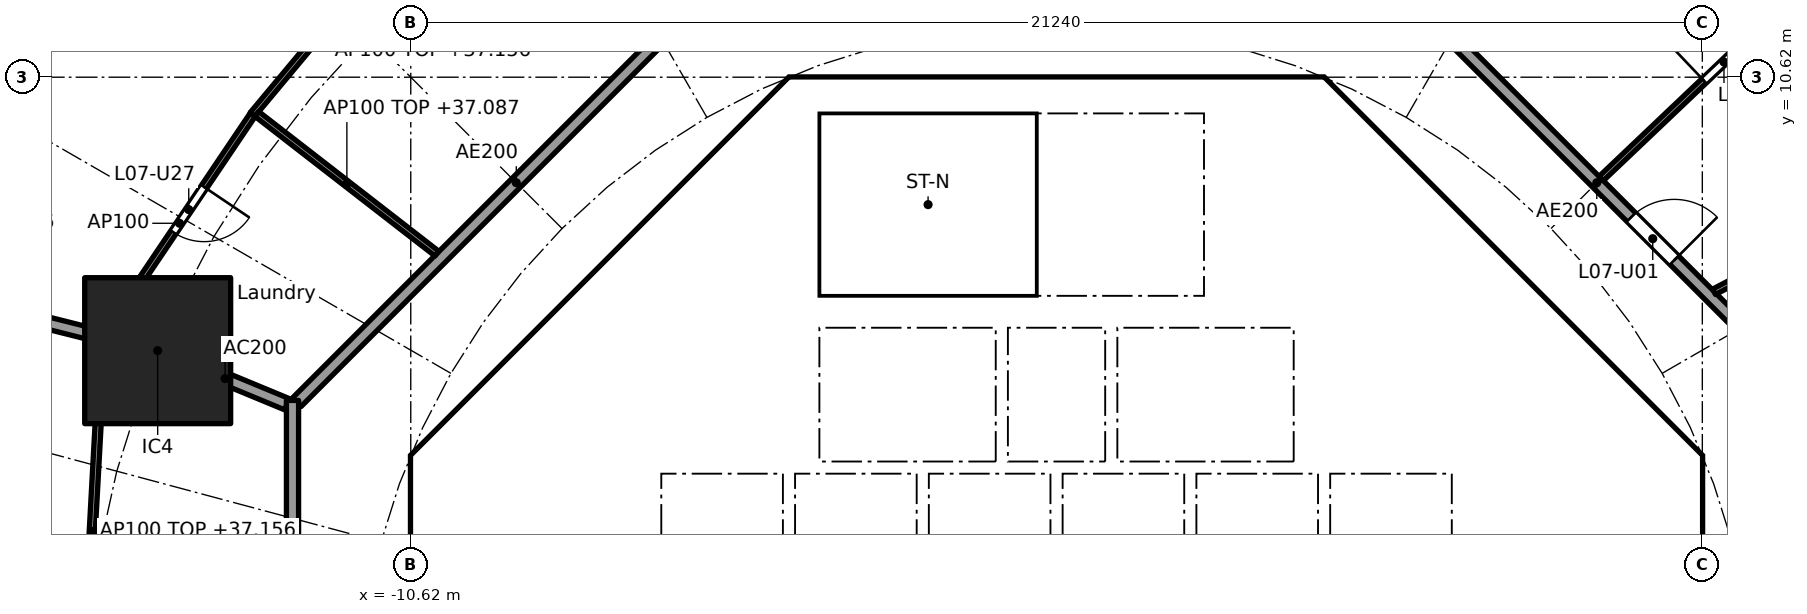
"""IFC4 building model, lengths in metres.
Left out: names, types, materials, properties, quantities, classifications, styles, units other than length and angle.
Written with IfcOpenShell. Run it as: python <this file> out.ifc"""

import sys

from ifc_helpers import new_model, si_unit, direction, frame, frame_2d, origin, origin_2d, place, context, subcontext, project, spatial, polyline, rectangle, outline, extrude, element, fill, save


model = new_model("IFC4")
c1 = context("Model", 3, precision=1e-05, world=origin(), true_north=direction((0.0, 1.0)))
c2 = subcontext(c1, "Body", "Model", "MODEL_VIEW")
j1 = project(units=[si_unit("LENGTHUNIT", "METRE"), si_unit("PLANEANGLEUNIT", "RADIAN")], contexts=[c1])
p1 = place(None, origin())
s1 = spatial("IfcSite", under=j1, at=p1, CompositionType="ELEMENT")
p2 = place(p1, origin())
s2 = spatial("IfcBuilding", under=s1, at=p2, CompositionType="ELEMENT")
p3 = place(p2, frame((0.0, 0.0, 34.4)))
s3 = spatial("IfcBuildingStorey", under=s2, at=p3, CompositionType="ELEMENT", Elevation=34.4)
p4 = place(p3, frame((-14.782, 6.123, 0.0), z_axis=(0.0, 0.0, 1.0), x_axis=(1.0, 0.0, 0.0)))
e1 = element("IfcColumn", 1, at=p4, inside=s3, PredefinedType="COLUMN", context=c2, shape_type="SweptSolid", body=[
    extrude(rectangle(XDim=2.4, YDim=2.4, at=origin_2d()), origin(), (0.0, 0.0, 1.0), 3.7),
])
p5 = place(p3, frame((9.988, 4.613, 0.0), z_axis=(0.0, 0.0, 1.0), x_axis=(-0.707106781187, 0.707106781187, 0.0)))
e2 = element("IfcWall", 2, at=p5, inside=s3, PredefinedType="SHEAR", context=c2, shape_type="SweptSolid", body=[
    extrude(rectangle(XDim=7.602, YDim=0.6, at=frame_2d((3.801, 0.0))), origin(), (0.0, 0.0, 1.0), 3.44),
])
p6 = place(p5, frame((3.201, 0.0, 0.0)))
e3 = element("IfcOpeningElement", 3, at=p6, cuts=e2, PredefinedType="OPENING", context=c2, shape_type="SweptSolid", body=[
    extrude(rectangle(XDim=1.2, YDim=2.1, at=frame_2d((0.6, 1.05))), frame((0.0, 0.31, 0.0), z_axis=(0.0, -1.0, 0.0), x_axis=(1.0, 0.0, 0.0)), (0.0, 0.0, 1.0), 0.62),
])
p7 = place(p3, frame((-4.613, 9.988, 0.0), z_axis=(0.0, 0.0, 1.0), x_axis=(-0.707106781187, -0.707106781187, 0.0)))
e4 = element("IfcWall", 4, at=p7, inside=s3, PredefinedType="SHEAR", context=c2, shape_type="SweptSolid", body=[
    extrude(rectangle(XDim=7.602, YDim=0.6, at=frame_2d((3.801, 0.0))), origin(), (0.0, 0.0, 1.0), 3.44),
])
p8 = place(p7, frame((0.351, 0.0, 0.0)))
e5 = element("IfcOpeningElement", 5, at=p8, cuts=e4, PredefinedType="OPENING", context=c2, shape_type="SweptSolid", body=[
    extrude(rectangle(XDim=1.1, YDim=2.1, at=frame_2d((0.55, 1.05))), frame((0.0, 0.31, 0.0), z_axis=(0.0, -1.0, 0.0), x_axis=(1.0, 0.0, 0.0)), (0.0, 0.0, 1.0), 0.62),
])
p9 = place(p3, frame((-10.325, 3.801, 0.0), z_axis=(0.0, 0.0, 1.0), x_axis=(0.0, -1.0, 0.0)))
e6 = element("IfcWall", 6, at=p9, inside=s3, PredefinedType="SHEAR", context=c2, shape_type="SweptSolid", body=[
    extrude(rectangle(XDim=7.602, YDim=0.6, at=frame_2d((3.801, 0.0))), origin(), (0.0, 0.0, 1.0), 3.44),
])
p10 = place(p9, frame((0.651, 0.0, 0.0)))
e7 = element("IfcOpeningElement", 7, at=p10, cuts=e6, PredefinedType="OPENING", context=c2, shape_type="SweptSolid", body=[
    extrude(rectangle(XDim=1.5, YDim=2.1, at=frame_2d((0.75, 1.05))), frame((0.0, 0.31, 0.0), z_axis=(0.0, -1.0, 0.0), x_axis=(1.0, 0.0, 0.0)), (0.0, 0.0, 1.0), 0.62),
])
p11 = place(p9, frame((5.451, 0.0, 0.0)))
e8 = element("IfcOpeningElement", 8, at=p11, cuts=e6, PredefinedType="OPENING", context=c2, shape_type="SweptSolid", body=[
    extrude(rectangle(XDim=1.5, YDim=2.1, at=frame_2d((0.75, 1.05))), frame((0.0, 0.31, 0.0), z_axis=(0.0, -1.0, 0.0), x_axis=(1.0, 0.0, 0.0)), (0.0, 0.0, 1.0), 0.62),
])
p12 = place(p3, frame((-6.2, 4.3, 0.0), z_axis=(0.0, 0.0, 1.0), x_axis=(0.0, 1.0, 0.0)))
e9 = element("IfcWall", 9, at=p12, inside=s3, PredefinedType="PARTITIONING", context=c2, shape_type="SweptSolid", body=[
    extrude(rectangle(XDim=3.527, YDim=0.15, at=frame_2d((1.763, 0.0))), origin(), (0.0, 0.0, 1.0), 3.44),
])
p13 = place(p12, frame((0.262, 0.0, 0.0)))
e10 = element("IfcOpeningElement", 10, at=p13, cuts=e9, PredefinedType="OPENING", context=c2, shape_type="SweptSolid", body=[
    extrude(rectangle(XDim=0.9, YDim=2.1, at=frame_2d((0.45, 1.05))), frame((0.0, 0.085, 0.0), z_axis=(0.0, -1.0, 0.0), x_axis=(1.0, 0.0, 0.0)), (0.0, 0.0, 1.0), 0.17),
])
p14 = place(p12, frame((2.138, 0.0, 0.0)))
e11 = element("IfcOpeningElement", 11, at=p14, cuts=e9, PredefinedType="OPENING", context=c2, shape_type="SweptSolid", body=[
    extrude(rectangle(XDim=0.9, YDim=2.1, at=frame_2d((0.45, 1.05))), frame((0.0, 0.085, 0.0), z_axis=(0.0, -1.0, 0.0), x_axis=(1.0, 0.0, 0.0)), (0.0, 0.0, 1.0), 0.17),
])
p15 = place(p3, frame((4.0, 4.3, 0.0), z_axis=(0.0, 0.0, 1.0), x_axis=(0.0, 1.0, 0.0)))
e12 = element("IfcWall", 12, at=p15, inside=s3, PredefinedType="SOLIDWALL", context=c2, shape_type="SweptSolid", body=[
    extrude(rectangle(XDim=2.2, YDim=0.2, at=frame_2d((1.1, 0.0))), origin(), (0.0, 0.0, 1.0), 3.44),
])
p16 = place(p15, frame((0.55, 0.0, 0.0)))
e13 = element("IfcOpeningElement", 13, at=p16, cuts=e12, PredefinedType="OPENING", context=c2, shape_type="SweptSolid", body=[
    extrude(rectangle(XDim=1.1, YDim=2.1, at=frame_2d((0.55, 1.05))), frame((0.0, 0.11, 0.0), z_axis=(0.0, -1.0, 0.0), x_axis=(1.0, 0.0, 0.0)), (0.0, 0.0, 1.0), 0.22),
])
p17 = place(p3, frame((-4.0, 4.3, 0.0), z_axis=(0.0, 0.0, 1.0), x_axis=(0.0, 1.0, 0.0)))
e14 = element("IfcWall", 14, at=p17, inside=s3, PredefinedType="SOLIDWALL", context=c2, shape_type="SweptSolid", body=[
    extrude(rectangle(XDim=2.2, YDim=0.2, at=frame_2d((1.1, 0.0))), origin(), (0.0, 0.0, 1.0), 3.44),
])
p18 = place(p17, frame((0.55, 0.0, 0.0)))
e15 = element("IfcOpeningElement", 15, at=p18, cuts=e14, PredefinedType="OPENING", context=c2, shape_type="SweptSolid", body=[
    extrude(rectangle(XDim=1.1, YDim=2.1, at=frame_2d((0.55, 1.05))), frame((0.0, 0.11, 0.0), z_axis=(0.0, -1.0, 0.0), x_axis=(1.0, 0.0, 0.0)), (0.0, 0.0, 1.0), 0.22),
])
p19 = place(p3, frame((6.7, 4.0, 0.0), z_axis=(0.0, 0.0, 1.0), x_axis=(1.0, 0.0, 0.0)))
e16 = element("IfcWall", 16, at=p19, inside=s3, PredefinedType="SOLIDWALL", context=c2, shape_type="SweptSolid", body=[
    extrude(rectangle(XDim=3.325, YDim=0.2, at=frame_2d((1.662, 0.0))), origin(), (0.0, 0.0, 1.0), 3.44),
])
p20 = place(p19, frame((1.25, 0.0, 0.0)))
e17 = element("IfcOpeningElement", 17, at=p20, cuts=e16, PredefinedType="OPENING", context=c2, shape_type="SweptSolid", body=[
    extrude(rectangle(XDim=1.1, YDim=2.1, at=frame_2d((0.55, 1.05))), frame((0.0, 0.11, 0.0), z_axis=(0.0, -1.0, 0.0), x_axis=(1.0, 0.0, 0.0)), (0.0, 0.0, 1.0), 0.22),
])
p21 = place(p3, frame((4.0, 7.025, 0.0), z_axis=(0.0, 0.0, 1.0), x_axis=(0.0, 1.0, 0.0)))
e18 = element("IfcWall", 18, at=p21, inside=s3, PredefinedType="SOLIDWALL", context=c2, shape_type="SweptSolid", body=[
    extrude(rectangle(XDim=3.0, YDim=0.2, at=frame_2d((1.5, 0.0))), origin(), (0.0, 0.0, 1.0), 3.44),
])
p22 = place(p21, frame((0.925, 0.0, 0.0)))
e19 = element("IfcOpeningElement", 19, at=p22, cuts=e18, PredefinedType="OPENING", context=c2, shape_type="SweptSolid", body=[
    extrude(rectangle(XDim=1.1, YDim=2.1, at=frame_2d((0.55, 1.05))), frame((0.0, 0.11, 0.0), z_axis=(0.0, -1.0, 0.0), x_axis=(1.0, 0.0, 0.0)), (0.0, 0.0, 1.0), 0.22),
])
p23 = place(p3, origin())
e20 = element("IfcWall", 20, at=p23, inside=s3, PredefinedType="SHEAR", context=c2, shape_type="SweptSolid", body=[
    extrude(outline(polyline([(-10.2, 4.825), (-9.776, 4.401), (-10.025, 4.152), (-10.025, 3.801), (-10.625, 3.801), (-10.625, 4.401), (-10.2, 4.825)])), origin(), (0.0, 0.0, 1.0), 3.44),
])
p24 = place(p3, origin())
e21 = element("IfcWall", 21, at=p24, inside=s3, PredefinedType="SHEAR", context=c2, shape_type="SweptSolid", body=[
    extrude(outline(polyline([(-4.152, 10.025), (-4.401, 9.776), (-4.825, 10.2), (-4.401, 10.625), (4.401, 10.625), (4.825, 10.2), (4.401, 9.776), (4.152, 10.025), (-4.152, 10.025)])), origin(), (0.0, 0.0, 1.0), 3.44),
])
p25 = place(p3, origin())
e22 = element("IfcWall", 22, at=p25, inside=s3, PredefinedType="SHEAR", context=c2, shape_type="SweptSolid", body=[
    extrude(outline(polyline([(9.776, -4.401), (10.025, -4.152), (10.025, -3.801), (10.025, 4.152), (9.776, 4.401), (10.2, 4.825), (10.625, 4.401), (10.625, -4.401), (10.2, -4.825), (9.776, -4.401)])), origin(), (0.0, 0.0, 1.0), 3.44),
])
p26 = place(p3, frame((-10.025, 4.0, 0.0), z_axis=(0.0, 0.0, 1.0), x_axis=(1.0, 0.0, 0.0)))
e23 = element("IfcWall", 23, at=p26, inside=s3, PredefinedType="PARTITIONING", context=c2, shape_type="SweptSolid", body=[
    extrude(rectangle(XDim=3.325, YDim=0.2, at=frame_2d((1.662, 0.0))), origin(), (0.0, 0.0, 1.0), 3.44),
])
p27 = place(p3, frame((-8.301, 5.8, 0.0), z_axis=(0.0, 0.0, 1.0), x_axis=(1.0, 0.0, 0.0)))
e24 = element("IfcWall", 24, at=p27, inside=s3, PredefinedType="PARTITIONING", context=c2, shape_type="SweptSolid", body=[
    extrude(rectangle(XDim=2.026, YDim=0.15, at=frame_2d((1.013, 0.0))), origin(), (0.0, 0.0, 1.0), 3.44),
])
for number, where, z_axis, x_axis in (
    (25, (-0.9, 4.3, 0.0), (0.0, 0.0, 1.0), (0.0, 1.0, 0.0)),
    (26, (0.9, 4.3, 0.0), (0.0, 0.0, 1.0), (0.0, 1.0, 0.0)),
):
    element("IfcWall", number, at=place(p3, frame(where, z_axis=z_axis, x_axis=x_axis)), inside=s3, PredefinedType="SOLIDWALL", context=c2, shape_type="SweptSolid", body=[
        extrude(rectangle(XDim=2.2, YDim=0.2, at=frame_2d((1.1, 0.0))), origin(), (0.0, 0.0, 1.0), 3.44),
    ])
p28 = place(p3, origin())
e27 = element("IfcWall", 27, at=p28, inside=s3, PredefinedType="SOLIDWALL", context=c2, shape_type="SweptSolid", body=[
    extrude(outline(polyline([(-6.5, 2.1), (-6.7, 2.1), (-6.7, 4.3), (6.7, 4.3), (6.7, 2.1), (6.5, 2.1), (6.5, 4.1), (4.5, 4.1), (4.5, 2.1), (4.3, 2.1), (4.3, 4.1), (2.3, 4.1), (2.3, 2.1), (2.1, 2.1), (2.1, 4.1), (0.1, 4.1), (0.1, 2.1), (-0.1, 2.1), (-0.1, 4.1), (-2.1, 4.1), (-2.1, 2.1), (-2.3, 2.1), (-2.3, 4.1), (-4.3, 4.1), (-4.3, 2.1), (-4.5, 2.1), (-4.5, 4.1), (-6.5, 4.1), (-6.5, 2.1)])), origin(), (0.0, 0.0, 1.0), 3.44),
])
p29 = place(p3, origin())
e28 = element("IfcWall", 28, at=p29, inside=s3, PredefinedType="SOLIDWALL", context=c2, shape_type="SweptSolid", body=[
    extrude(outline(polyline([(-3.9, 7.025), (-4.1, 7.025), (-4.1, 10.025), (-3.9, 10.025), (-3.9, 7.025)])), origin(), (0.0, 0.0, 1.0), 3.44),
])
p30 = place(p3, origin())
e29 = element("IfcWall", 29, at=p30, inside=s3, PredefinedType="SOLIDWALL", context=c2, shape_type="SweptSolid", body=[
    extrude(outline(polyline([(4.1, 6.5), (-4.1, 6.5), (-4.1, 7.025), (4.1, 7.025), (4.1, 6.5)])), origin(), (0.0, 0.0, 1.0), 3.44),
])
p31 = place(p3, origin())
e30 = element("IfcWall", 30, at=p31, inside=s3, PredefinedType="SOLIDWALL", context=c2, shape_type="SweptSolid", body=[
    extrude(outline(polyline([(7.025, -3.9), (6.7, -3.9), (6.7, 3.9), (7.025, 3.9), (7.025, -3.9)])), origin(), (0.0, 0.0, 1.0), 3.44),
])
p32 = place(p3, frame((-12.657, 5.243, 0.0), z_axis=(0.0, 0.0, 1.0), x_axis=(-0.923885664896, 0.382668627144, 0.0)))
e31 = element("IfcWall", 31, at=p32, inside=s3, PredefinedType="PARTITIONING", context=c2, shape_type="SweptSolid", body=[
    extrude(rectangle(XDim=2.2, YDim=0.2, at=frame_2d((1.1, 0.0))), origin(), (0.0, 0.0, 1.0), 3.44),
])
p33 = place(p3, frame((-14.831, 6.135, 0.0), z_axis=(0.0, 0.0, 1.0), x_axis=(-0.969884949569, 0.243563512454, 0.0)))
e32 = element("IfcWall", 32, at=p33, inside=s3, PredefinedType="PARTITIONING", context=c2, shape_type="SweptSolid", body=[
    extrude(rectangle(XDim=8.829, YDim=0.2, at=frame_2d((4.415, 0.0))), origin(), (0.0, 0.0, 1.0), 2.756),
])
p34 = place(p3, frame((12.635, 5.134, 0.0), z_axis=(0.0, 0.0, 1.0), x_axis=(-0.707106781187, 0.707106781187, 0.0)))
e33 = element("IfcWall", 33, at=p34, inside=s3, PredefinedType="PARTITIONING", context=c2, shape_type="SweptSolid", body=[
    extrude(rectangle(XDim=10.609, YDim=0.2, at=frame_2d((5.305, 0.0))), origin(), (0.0, 0.0, 1.0), 3.44),
])
p35 = place(p34, frame((3.503, 0.0, 0.0)))
e34 = element("IfcOpeningElement", 34, at=p35, cuts=e33, PredefinedType="OPENING", context=c2, shape_type="SweptSolid", body=[
    extrude(rectangle(XDim=1.0, YDim=2.1, at=frame_2d((0.5, 1.05))), frame((0.0, 0.11, 0.0), z_axis=(0.0, -1.0, 0.0), x_axis=(1.0, 0.0, 0.0)), (0.0, 0.0, 1.0), 0.22),
])
p36 = place(p3, frame((-5.275, 12.494, 0.0), z_axis=(0.0, 0.0, 1.0), x_axis=(-0.707106781187, -0.707106781187, 0.0)))
e35 = element("IfcWall", 35, at=p36, inside=s3, PredefinedType="PARTITIONING", context=c2, shape_type="SweptSolid", body=[
    extrude(rectangle(XDim=10.209, YDim=0.2, at=frame_2d((5.104, 0.0))), origin(), (0.0, 0.0, 1.0), 3.44),
])
p37 = place(p3, frame((-12.565, 5.304, 0.0), z_axis=(0.0, 0.0, 1.0), x_axis=(0.0, -1.0, 0.0)))
e36 = element("IfcWall", 36, at=p37, inside=s3, PredefinedType="PARTITIONING", context=c2, shape_type="SweptSolid", body=[
    extrude(rectangle(XDim=10.409, YDim=0.2, at=frame_2d((5.205, 0.0))), origin(), (0.0, 0.0, 1.0), 3.44),
])
p38 = place(p3, frame((10.813, 7.091, 0.0), z_axis=(0.0, 0.0, 1.0), x_axis=(0.885182649479, 0.465243674928, 0.0)))
e37 = element("IfcWall", 37, at=p38, inside=s3, PredefinedType="PARTITIONING", context=c2, shape_type="SweptSolid", body=[
    extrude(rectangle(XDim=12.551, YDim=0.1, at=frame_2d((6.275, 0.0))), origin(), (0.0, 0.0, 1.0), 2.687),
])
p39 = place(p38, frame((0.539, 0.0, 0.0)))
e38 = element("IfcOpeningElement", 38, at=p39, cuts=e37, PredefinedType="OPENING", context=c2, shape_type="SweptSolid", body=[
    extrude(rectangle(XDim=0.9, YDim=2.1, at=frame_2d((0.45, 1.05))), frame((0.0, 0.06, 0.0), z_axis=(0.0, -1.0, 0.0), x_axis=(1.0, 0.0, 0.0)), (0.0, 0.0, 1.0), 0.12),
])
p40 = place(p38, frame((8.494, 0.0, 0.0)))
e39 = element("IfcOpeningElement", 39, at=p40, cuts=e37, PredefinedType="OPENING", context=c2, shape_type="SweptSolid", body=[
    extrude(rectangle(XDim=0.9, YDim=2.1, at=frame_2d((0.45, 1.05))), frame((0.0, 0.06, 0.0), z_axis=(0.0, -1.0, 0.0), x_axis=(1.0, 0.0, 0.0)), (0.0, 0.0, 1.0), 0.12),
])
p41 = place(p3, frame((8.957, 8.953, 0.0), z_axis=(0.0, 0.0, 1.0), x_axis=(0.725250022034, 0.688485588476, 0.0)))
e40 = element("IfcWall", 40, at=p41, inside=s3, PredefinedType="PARTITIONING", context=c2, shape_type="SweptSolid", body=[
    extrude(rectangle(XDim=12.963, YDim=0.1, at=frame_2d((6.481, 0.0))), origin(), (0.0, 0.0, 1.0), 2.687),
])
p42 = place(p41, frame((2.333, 0.0, 0.0)))
e41 = element("IfcOpeningElement", 41, at=p42, cuts=e40, PredefinedType="OPENING", context=c2, shape_type="SweptSolid", body=[
    extrude(rectangle(XDim=0.9, YDim=2.1, at=frame_2d((0.45, 1.05))), frame((0.0, 0.06, 0.0), z_axis=(0.0, -1.0, 0.0), x_axis=(1.0, 0.0, 0.0)), (0.0, 0.0, 1.0), 0.12),
])
p43 = place(p41, frame((8.79, 0.0, 0.0)))
e42 = element("IfcOpeningElement", 42, at=p43, cuts=e40, PredefinedType="OPENING", context=c2, shape_type="SweptSolid", body=[
    extrude(rectangle(XDim=0.9, YDim=2.1, at=frame_2d((0.45, 1.05))), frame((0.0, 0.06, 0.0), z_axis=(0.0, -1.0, 0.0), x_axis=(1.0, 0.0, 0.0)), (0.0, 0.0, 1.0), 0.12),
])
p44 = place(p3, frame((-10.123, 13.72, 0.0), z_axis=(0.0, 0.0, 1.0), x_axis=(-0.64083455704, -0.767679015282, 0.0)))
e43 = element("IfcWall", 43, at=p44, inside=s3, PredefinedType="PARTITIONING", context=c2, shape_type="SweptSolid", body=[
    extrude(rectangle(XDim=4.837, YDim=0.1, at=frame_2d((2.418, 0.0))), origin(), (0.0, 0.0, 1.0), 2.756),
])
p45 = place(p3, frame((-10.19, 7.719, 0.0), z_axis=(0.0, 0.0, 1.0), x_axis=(-0.790253294643, 0.612780327937, 0.0)))
e44 = element("IfcWall", 44, at=p45, inside=s3, PredefinedType="PARTITIONING", context=c2, shape_type="SweptSolid", body=[
    extrude(rectangle(XDim=3.746, YDim=0.1, at=frame_2d((1.873, 0.0))), origin(), (0.0, 0.0, 1.0), 2.687),
])
p46 = place(p3, frame((-13.218, 10.004, 0.0), z_axis=(0.0, 0.0, 1.0), x_axis=(-0.559112679527, -0.829091678641, 0.0)))
e45 = element("IfcWall", 45, at=p46, inside=s3, PredefinedType="PARTITIONING", context=c2, shape_type="SweptSolid", body=[
    extrude(rectangle(XDim=4.308, YDim=0.1, at=frame_2d((2.154, 0.0))), origin(), (0.0, 0.0, 1.0), 3.44),
])
p47 = place(p46, frame((1.433, 0.0, 0.0)))
e46 = element("IfcOpeningElement", 46, at=p47, cuts=e45, PredefinedType="OPENING", context=c2, shape_type="SweptSolid", body=[
    extrude(rectangle(XDim=0.9, YDim=2.1, at=frame_2d((0.45, 1.05))), frame((0.0, 0.06, 0.0), z_axis=(0.0, -1.0, 0.0), x_axis=(1.0, 0.0, 0.0)), (0.0, 0.0, 1.0), 0.12),
])
p48 = place(p3, frame((-15.688, 6.249, 0.0), z_axis=(0.0, 0.0, 1.0), x_axis=(-0.054659814056, -0.998505034903, 0.0)))
e47 = element("IfcWall", 47, at=p48, inside=s3, PredefinedType="PARTITIONING", context=c2, shape_type="SweptSolid", body=[
    extrude(rectangle(XDim=6.208, YDim=0.1, at=frame_2d((3.104, 0.0))), origin(), (0.0, 0.0, 1.0), 2.756),
])
p49 = place(p16, origin())
e48 = element("IfcDoor", 48, at=p49, inside=s3, OperationType="DOUBLE_DOOR_SLIDING", PredefinedType="DOOR", context=c2, shape_type="SweptSolid", body=[
    extrude(rectangle(XDim=1.1, YDim=2.1, at=frame_2d((0.55, 1.05))), frame((0.0, 0.025, 0.0), z_axis=(0.0, -1.0, 0.0), x_axis=(1.0, 0.0, 0.0)), (0.0, 0.0, 1.0), 0.05),
])
fill(e13, e48)
p50 = place(p18, origin())
e49 = element("IfcDoor", 49, at=p50, inside=s3, OperationType="DOUBLE_DOOR_SLIDING", PredefinedType="DOOR", context=c2, shape_type="SweptSolid", body=[
    extrude(rectangle(XDim=1.1, YDim=2.1, at=frame_2d((0.55, 1.05))), frame((0.0, 0.025, 0.0), z_axis=(0.0, -1.0, 0.0), x_axis=(1.0, 0.0, 0.0)), (0.0, 0.0, 1.0), 0.05),
])
fill(e15, e49)
p51 = place(p20, frame((1.1, 0.0, 0.0), x_axis=(-1.0, 0.0, 0.0)))
e50 = element("IfcDoor", 50, at=p51, inside=s3, OperationType="SINGLE_SWING_RIGHT", PredefinedType="DOOR", context=c2, shape_type="SweptSolid", body=[
    extrude(rectangle(XDim=1.1, YDim=2.1, at=frame_2d((0.55, 1.05))), frame((0.0, 0.025, 0.0), z_axis=(0.0, -1.0, 0.0), x_axis=(1.0, 0.0, 0.0)), (0.0, 0.0, 1.0), 0.05),
])
fill(e17, e50)
p52 = place(p22, origin())
e51 = element("IfcDoor", 51, at=p52, inside=s3, OperationType="SINGLE_SWING_LEFT", PredefinedType="DOOR", context=c2, shape_type="SweptSolid", body=[
    extrude(rectangle(XDim=1.1, YDim=2.1, at=frame_2d((0.55, 1.05))), frame((0.0, 0.025, 0.0), z_axis=(0.0, -1.0, 0.0), x_axis=(1.0, 0.0, 0.0)), (0.0, 0.0, 1.0), 0.05),
])
fill(e19, e51)
p53 = place(p13, origin())
e52 = element("IfcDoor", 52, at=p53, inside=s3, OperationType="SINGLE_SWING_RIGHT", PredefinedType="DOOR", context=c2, shape_type="SweptSolid", body=[
    extrude(rectangle(XDim=0.9, YDim=2.1, at=frame_2d((0.45, 1.05))), frame((0.0, 0.025, 0.0), z_axis=(0.0, -1.0, 0.0), x_axis=(1.0, 0.0, 0.0)), (0.0, 0.0, 1.0), 0.05),
])
fill(e10, e52)
p54 = place(p14, origin())
e53 = element("IfcDoor", 53, at=p54, inside=s3, OperationType="SINGLE_SWING_RIGHT", PredefinedType="DOOR", context=c2, shape_type="SweptSolid", body=[
    extrude(rectangle(XDim=0.9, YDim=2.1, at=frame_2d((0.45, 1.05))), frame((0.0, 0.025, 0.0), z_axis=(0.0, -1.0, 0.0), x_axis=(1.0, 0.0, 0.0)), (0.0, 0.0, 1.0), 0.05),
])
fill(e11, e53)
p55 = place(p6, origin())
e54 = element("IfcDoor", 54, at=p55, inside=s3, OperationType="SINGLE_SWING_RIGHT", PredefinedType="DOOR", context=c2, shape_type="SweptSolid", body=[
    extrude(rectangle(XDim=1.2, YDim=2.1, at=frame_2d((0.6, 1.05))), frame((0.0, 0.025, 0.0), z_axis=(0.0, -1.0, 0.0), x_axis=(1.0, 0.0, 0.0)), (0.0, 0.0, 1.0), 0.05),
])
fill(e3, e54)
p56 = place(p10, origin())
e55 = element("IfcDoor", 55, at=p56, inside=s3, OperationType="DOUBLE_DOOR_SINGLE_SWING", PredefinedType="DOOR", context=c2, shape_type="SweptSolid", body=[
    extrude(rectangle(XDim=1.5, YDim=2.1, at=frame_2d((0.75, 1.05))), frame((0.0, 0.025, 0.0), z_axis=(0.0, -1.0, 0.0), x_axis=(1.0, 0.0, 0.0)), (0.0, 0.0, 1.0), 0.05),
])
fill(e7, e55)
p57 = place(p8, origin())
e56 = element("IfcDoor", 56, at=p57, inside=s3, OperationType="SINGLE_SWING_RIGHT", PredefinedType="DOOR", context=c2, shape_type="SweptSolid", body=[
    extrude(rectangle(XDim=1.1, YDim=2.1, at=frame_2d((0.55, 1.05))), frame((0.0, 0.025, 0.0), z_axis=(0.0, -1.0, 0.0), x_axis=(1.0, 0.0, 0.0)), (0.0, 0.0, 1.0), 0.05),
])
fill(e5, e56)
p58 = place(p35, frame((1.0, 0.0, 0.0), x_axis=(-1.0, 0.0, 0.0)))
e57 = element("IfcDoor", 57, at=p58, inside=s3, OperationType="SINGLE_SWING_RIGHT", PredefinedType="DOOR", context=c2, shape_type="SweptSolid", body=[
    extrude(rectangle(XDim=1.0, YDim=2.1, at=frame_2d((0.5, 1.05))), frame((0.0, 0.025, 0.0), z_axis=(0.0, -1.0, 0.0), x_axis=(1.0, 0.0, 0.0)), (0.0, 0.0, 1.0), 0.05),
])
fill(e34, e57)
p59 = place(p42, origin())
e58 = element("IfcDoor", 58, at=p59, inside=s3, OperationType="SINGLE_SWING_LEFT", PredefinedType="DOOR", context=c2, shape_type="SweptSolid", body=[
    extrude(rectangle(XDim=0.9, YDim=2.1, at=frame_2d((0.45, 1.05))), frame((0.0, 0.025, 0.0), z_axis=(0.0, -1.0, 0.0), x_axis=(1.0, 0.0, 0.0)), (0.0, 0.0, 1.0), 0.05),
])
fill(e41, e58)
p60 = place(p47, origin())
e59 = element("IfcDoor", 59, at=p60, inside=s3, OperationType="SINGLE_SWING_LEFT", PredefinedType="DOOR", context=c2, shape_type="SweptSolid", body=[
    extrude(rectangle(XDim=0.9, YDim=2.1, at=frame_2d((0.45, 1.05))), frame((0.0, 0.025, 0.0), z_axis=(0.0, -1.0, 0.0), x_axis=(1.0, 0.0, 0.0)), (0.0, 0.0, 1.0), 0.05),
])
fill(e46, e59)
save(model, sys.argv[1])
